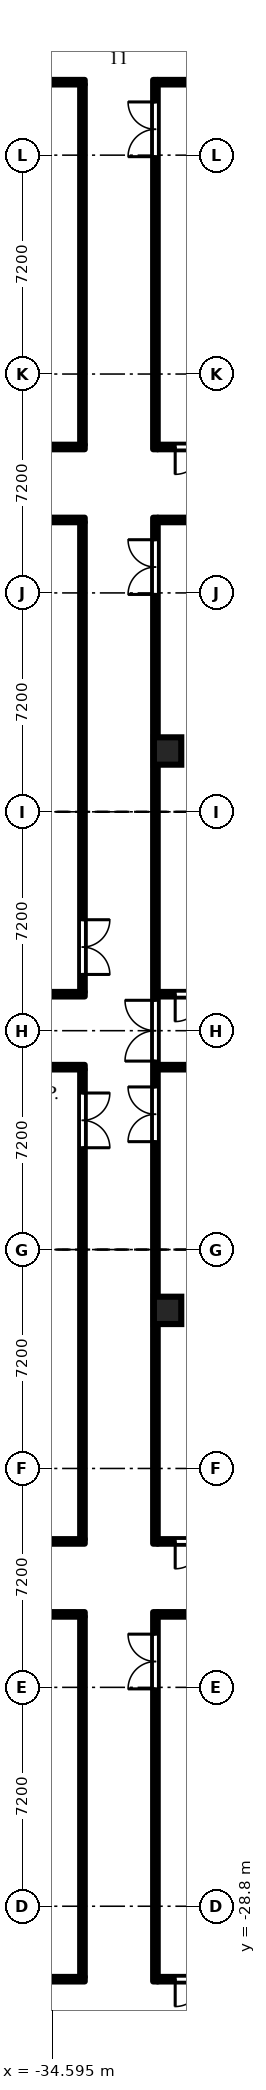
"""IFC4 building model, lengths in metres.
Left out: names, types, materials, properties, quantities, classifications, styles, units other than length and angle.
Written with IfcOpenShell. Run it as: python <this file> out.ifc"""

import sys

from ifc_helpers import new_model, si_unit, direction, frame, frame_2d, origin, origin_2d, place, context, subcontext, project, spatial, rectangle, extrude, element, fill, save


model = new_model("IFC4")
c1 = context("Model", 3, precision=1e-05, world=origin(), true_north=direction((0.0, 1.0)))
c2 = subcontext(c1, "Body", "Model", "MODEL_VIEW")
j1 = project(units=[si_unit("LENGTHUNIT", "METRE"), si_unit("PLANEANGLEUNIT", "RADIAN")], contexts=[c1])
p1 = place(None, origin())
s1 = spatial("IfcSite", under=j1, at=p1, CompositionType="ELEMENT")
p2 = place(p1, origin())
s2 = spatial("IfcBuilding", under=s1, at=p2, CompositionType="ELEMENT")
p3 = place(p2, frame((0.0, 0.0, -4.8)))
s3 = spatial("IfcBuildingStorey", under=s2, at=p3, CompositionType="ELEMENT", Elevation=-4.8)
for number, where, z_axis, x_axis in (
    (1, (-30.8, -9.2, -0.5), (0.0, 0.0, 1.0), (1.0, 0.0, 0.0)),
    (2, (-30.8, 9.2, -0.5), (0.0, 0.0, 1.0), (1.0, 0.0, 0.0)),
):
    element("IfcColumn", number, at=place(p3, frame(where, z_axis=z_axis, x_axis=x_axis)), inside=s3, PredefinedType="COLUMN", context=c2, shape_type="SweptSolid", body=[
        extrude(rectangle(XDim=0.9, YDim=0.9, at=origin_2d()), origin(), (0.0, 0.0, 1.0), 5.3),
    ])
p4 = place(p3, frame((-41.225, -31.2, 0.0), z_axis=(0.0, 0.0, 1.0), x_axis=(1.0, 0.0, 0.0)))
e3 = element("IfcWall", 3, at=p4, inside=s3, PredefinedType="PARTITIONING", context=c2, shape_type="SweptSolid", body=[
    extrude(rectangle(XDim=7.7, YDim=0.15, at=frame_2d((3.85, 0.0))), origin(), (0.0, 0.0, 1.0), 4.35),
])
p5 = place(p4, frame((2.375, 0.0, 0.0)))
e4 = element("IfcOpeningElement", 4, at=p5, cuts=e3, PredefinedType="OPENING", context=c2, shape_type="SweptSolid", body=[
    extrude(rectangle(XDim=1.8, YDim=2.1, at=frame_2d((0.9, 1.05))), frame((0.0, 0.085, 0.0), z_axis=(0.0, -1.0, 0.0), x_axis=(1.0, 0.0, 0.0)), (0.0, 0.0, 1.0), 0.17),
])
p6 = place(p3, frame((-41.225, -19.2, 0.0), z_axis=(0.0, 0.0, 1.0), x_axis=(1.0, 0.0, 0.0)))
e5 = element("IfcWall", 5, at=p6, inside=s3, PredefinedType="PARTITIONING", context=c2, shape_type="SweptSolid", body=[
    extrude(rectangle(XDim=7.7, YDim=0.15, at=frame_2d((3.85, 0.0))), origin(), (0.0, 0.0, 1.0), 4.35),
])
p7 = place(p6, frame((3.375, 0.0, 0.0)))
e6 = element("IfcOpeningElement", 6, at=p7, cuts=e5, PredefinedType="OPENING", context=c2, shape_type="SweptSolid", body=[
    extrude(rectangle(XDim=1.8, YDim=2.1, at=frame_2d((0.9, 1.05))), frame((0.0, 0.085, 0.0), z_axis=(0.0, -1.0, 0.0), x_axis=(1.0, 0.0, 0.0)), (0.0, 0.0, 1.0), 0.17),
])
p8 = place(p3, frame((-41.225, -16.8, 0.0), z_axis=(0.0, 0.0, 1.0), x_axis=(1.0, 0.0, 0.0)))
e7 = element("IfcWall", 7, at=p8, inside=s3, PredefinedType="PARTITIONING", context=c2, shape_type="SweptSolid", body=[
    extrude(rectangle(XDim=7.7, YDim=0.15, at=frame_2d((3.85, 0.0))), origin(), (0.0, 0.0, 1.0), 4.35),
])
p9 = place(p8, frame((2.375, 0.0, 0.0)))
e8 = element("IfcOpeningElement", 8, at=p9, cuts=e7, PredefinedType="OPENING", context=c2, shape_type="SweptSolid", body=[
    extrude(rectangle(XDim=1.8, YDim=2.1, at=frame_2d((0.9, 1.05))), frame((0.0, 0.085, 0.0), z_axis=(0.0, -1.0, 0.0), x_axis=(1.0, 0.0, 0.0)), (0.0, 0.0, 1.0), 0.17),
])
p10 = place(p3, frame((-41.225, 16.8, 0.0), z_axis=(0.0, 0.0, 1.0), x_axis=(1.0, 0.0, 0.0)))
e9 = element("IfcWall", 9, at=p10, inside=s3, PredefinedType="PARTITIONING", context=c2, shape_type="SweptSolid", body=[
    extrude(rectangle(XDim=7.7, YDim=0.15, at=frame_2d((3.85, 0.0))), origin(), (0.0, 0.0, 1.0), 4.35),
])
p11 = place(p10, frame((3.375, 0.0, 0.0)))
e10 = element("IfcOpeningElement", 10, at=p11, cuts=e9, PredefinedType="OPENING", context=c2, shape_type="SweptSolid", body=[
    extrude(rectangle(XDim=1.8, YDim=2.1, at=frame_2d((0.9, 1.05))), frame((0.0, 0.085, 0.0), z_axis=(0.0, -1.0, 0.0), x_axis=(1.0, 0.0, 0.0)), (0.0, 0.0, 1.0), 0.17),
])
p12 = place(p3, frame((-41.225, 19.2, 0.0), z_axis=(0.0, 0.0, 1.0), x_axis=(1.0, 0.0, 0.0)))
e11 = element("IfcWall", 11, at=p12, inside=s3, PredefinedType="PARTITIONING", context=c2, shape_type="SweptSolid", body=[
    extrude(rectangle(XDim=7.7, YDim=0.15, at=frame_2d((3.85, 0.0))), origin(), (0.0, 0.0, 1.0), 4.35),
])
p13 = place(p12, frame((2.375, 0.0, 0.0)))
e12 = element("IfcOpeningElement", 12, at=p13, cuts=e11, PredefinedType="OPENING", context=c2, shape_type="SweptSolid", body=[
    extrude(rectangle(XDim=1.8, YDim=2.1, at=frame_2d((0.9, 1.05))), frame((0.0, 0.085, 0.0), z_axis=(0.0, -1.0, 0.0), x_axis=(1.0, 0.0, 0.0)), (0.0, 0.0, 1.0), 0.17),
])
p14 = place(p3, frame((-41.225, 31.2, 0.0), z_axis=(0.0, 0.0, 1.0), x_axis=(1.0, 0.0, 0.0)))
e13 = element("IfcWall", 13, at=p14, inside=s3, PredefinedType="PARTITIONING", context=c2, shape_type="SweptSolid", body=[
    extrude(rectangle(XDim=7.7, YDim=0.15, at=frame_2d((3.85, 0.0))), origin(), (0.0, 0.0, 1.0), 4.35),
])
p15 = place(p14, frame((3.375, 0.0, 0.0)))
e14 = element("IfcOpeningElement", 14, at=p15, cuts=e13, PredefinedType="OPENING", context=c2, shape_type="SweptSolid", body=[
    extrude(rectangle(XDim=1.8, YDim=2.1, at=frame_2d((0.9, 1.05))), frame((0.0, 0.085, 0.0), z_axis=(0.0, -1.0, 0.0), x_axis=(1.0, 0.0, 0.0)), (0.0, 0.0, 1.0), 0.17),
])
for number, where, z_axis, x_axis in (
    (15, (-36.5, -1.2, 0.0), (0.0, 0.0, 1.0), (1.0, 0.0, 0.0)),
    (16, (-36.5, 1.2, 0.0), (0.0, 0.0, 1.0), (1.0, 0.0, 0.0)),
):
    element("IfcWall", number, at=place(p3, frame(where, z_axis=z_axis, x_axis=x_axis)), inside=s3, PredefinedType="PARTITIONING", context=c2, shape_type="SweptSolid", body=[
        extrude(rectangle(XDim=2.975, YDim=0.15, at=frame_2d((1.488, 0.0))), origin(), (0.0, 0.0, 1.0), 4.35),
    ])
p16 = place(p3, frame((-33.6, -31.125, 0.0), z_axis=(0.0, 0.0, 1.0), x_axis=(0.0, 1.0, 0.0)))
e17 = element("IfcWall", 17, at=p16, inside=s3, PredefinedType="PARTITIONING", context=c2, shape_type="SweptSolid", body=[
    extrude(rectangle(XDim=11.85, YDim=0.15, at=frame_2d((5.925, 0.0))), origin(), (0.0, 0.0, 1.0), 4.35),
])
p17 = place(p3, frame((-33.6, -16.725, 0.0), z_axis=(0.0, 0.0, 1.0), x_axis=(0.0, 1.0, 0.0)))
e18 = element("IfcWall", 18, at=p17, inside=s3, PredefinedType="PARTITIONING", context=c2, shape_type="SweptSolid", body=[
    extrude(rectangle(XDim=15.45, YDim=0.15, at=frame_2d((7.725, 0.0))), origin(), (0.0, 0.0, 1.0), 4.35),
])
p18 = place(p17, frame((12.875, 0.0, 0.0)))
e19 = element("IfcOpeningElement", 19, at=p18, cuts=e18, PredefinedType="OPENING", context=c2, shape_type="SweptSolid", body=[
    extrude(rectangle(XDim=1.8, YDim=2.1, at=frame_2d((0.9, 1.05))), frame((0.0, 0.085, 0.0), z_axis=(0.0, -1.0, 0.0), x_axis=(1.0, 0.0, 0.0)), (0.0, 0.0, 1.0), 0.17),
])
p19 = place(p3, frame((-33.6, 1.275, 0.0), z_axis=(0.0, 0.0, 1.0), x_axis=(0.0, 1.0, 0.0)))
e20 = element("IfcWall", 20, at=p19, inside=s3, PredefinedType="PARTITIONING", context=c2, shape_type="SweptSolid", body=[
    extrude(rectangle(XDim=15.45, YDim=0.15, at=frame_2d((7.725, 0.0))), origin(), (0.0, 0.0, 1.0), 4.35),
])
p20 = place(p19, frame((0.575, 0.0, 0.0)))
e21 = element("IfcOpeningElement", 21, at=p20, cuts=e20, PredefinedType="OPENING", context=c2, shape_type="SweptSolid", body=[
    extrude(rectangle(XDim=1.8, YDim=2.1, at=frame_2d((0.9, 1.05))), frame((0.0, 0.085, 0.0), z_axis=(0.0, -1.0, 0.0), x_axis=(1.0, 0.0, 0.0)), (0.0, 0.0, 1.0), 0.17),
])
p21 = place(p3, frame((-33.6, 19.275, 0.0), z_axis=(0.0, 0.0, 1.0), x_axis=(0.0, 1.0, 0.0)))
e22 = element("IfcWall", 22, at=p21, inside=s3, PredefinedType="PARTITIONING", context=c2, shape_type="SweptSolid", body=[
    extrude(rectangle(XDim=11.85, YDim=0.15, at=frame_2d((5.925, 0.0))), origin(), (0.0, 0.0, 1.0), 4.35),
])
p22 = place(p3, frame((-31.2, -31.275, 0.0), z_axis=(0.0, 0.0, 1.0), x_axis=(0.0, 1.0, 0.0)))
e23 = element("IfcWall", 23, at=p22, inside=s3, PredefinedType="PARTITIONING", context=c2, shape_type="SweptSolid", body=[
    extrude(rectangle(XDim=12.15, YDim=0.15, at=frame_2d((6.075, 0.0))), origin(), (0.0, 0.0, 1.0), 4.35),
])
p23 = place(p22, frame((9.625, 0.0, 0.0)))
e24 = element("IfcOpeningElement", 24, at=p23, cuts=e23, PredefinedType="OPENING", context=c2, shape_type="SweptSolid", body=[
    extrude(rectangle(XDim=1.8, YDim=2.1, at=frame_2d((0.9, 1.05))), frame((0.0, 0.085, 0.0), z_axis=(0.0, -1.0, 0.0), x_axis=(1.0, 0.0, 0.0)), (0.0, 0.0, 1.0), 0.17),
])
p24 = place(p3, frame((-31.125, -31.2, 0.0), z_axis=(0.0, 0.0, 1.0), x_axis=(1.0, 0.0, 0.0)))
e25 = element("IfcWall", 25, at=p24, inside=s3, PredefinedType="PARTITIONING", context=c2, shape_type="SweptSolid", body=[
    extrude(rectangle(XDim=12.6, YDim=0.15, at=frame_2d((6.3, 0.0))), origin(), (0.0, 0.0, 1.0), 4.35),
])
p25 = place(p24, frame((0.575, 0.0, 0.0)))
e26 = element("IfcOpeningElement", 26, at=p25, cuts=e25, PredefinedType="OPENING", context=c2, shape_type="SweptSolid", body=[
    extrude(rectangle(XDim=1.8, YDim=2.1, at=frame_2d((0.9, 1.05))), frame((0.0, 0.085, 0.0), z_axis=(0.0, -1.0, 0.0), x_axis=(1.0, 0.0, 0.0)), (0.0, 0.0, 1.0), 0.17),
])
p26 = place(p3, frame((-31.125, -19.2, 0.0), z_axis=(0.0, 0.0, 1.0), x_axis=(1.0, 0.0, 0.0)))
e27 = element("IfcWall", 27, at=p26, inside=s3, PredefinedType="PARTITIONING", context=c2, shape_type="SweptSolid", body=[
    extrude(rectangle(XDim=12.6, YDim=0.15, at=frame_2d((6.3, 0.0))), origin(), (0.0, 0.0, 1.0), 4.35),
])
p27 = place(p26, frame((10.075, 0.0, 0.0)))
e28 = element("IfcOpeningElement", 28, at=p27, cuts=e27, PredefinedType="OPENING", context=c2, shape_type="SweptSolid", body=[
    extrude(rectangle(XDim=1.8, YDim=2.1, at=frame_2d((0.9, 1.05))), frame((0.0, 0.085, 0.0), z_axis=(0.0, -1.0, 0.0), x_axis=(1.0, 0.0, 0.0)), (0.0, 0.0, 1.0), 0.17),
])
p28 = place(p3, frame((-31.2, -16.875, 0.0), z_axis=(0.0, 0.0, 1.0), x_axis=(0.0, 1.0, 0.0)))
e29 = element("IfcWall", 29, at=p28, inside=s3, PredefinedType="PARTITIONING", context=c2, shape_type="SweptSolid", body=[
    extrude(rectangle(XDim=33.75, YDim=0.15, at=frame_2d((16.875, 0.0))), origin(), (0.0, 0.0, 1.0), 4.35),
])
p29 = place(p28, frame((15.875, 0.0, 0.0)))
e30 = element("IfcOpeningElement", 30, at=p29, cuts=e29, PredefinedType="OPENING", context=c2, shape_type="SweptSolid", body=[
    extrude(rectangle(XDim=2.0, YDim=2.1, at=frame_2d((1.0, 1.05))), frame((0.0, 0.085, 0.0), z_axis=(0.0, -1.0, 0.0), x_axis=(1.0, 0.0, 0.0)), (0.0, 0.0, 1.0), 0.17),
])
p30 = place(p28, frame((31.225, 0.0, 0.0)))
e31 = element("IfcOpeningElement", 31, at=p30, cuts=e29, PredefinedType="OPENING", context=c2, shape_type="SweptSolid", body=[
    extrude(rectangle(XDim=1.8, YDim=2.1, at=frame_2d((0.9, 1.05))), frame((0.0, 0.085, 0.0), z_axis=(0.0, -1.0, 0.0), x_axis=(1.0, 0.0, 0.0)), (0.0, 0.0, 1.0), 0.17),
])
p31 = place(p28, frame((13.225, 0.0, 0.0)))
e32 = element("IfcOpeningElement", 32, at=p31, cuts=e29, PredefinedType="OPENING", context=c2, shape_type="SweptSolid", body=[
    extrude(rectangle(XDim=1.8, YDim=2.1, at=frame_2d((0.9, 1.05))), frame((0.0, 0.085, 0.0), z_axis=(0.0, -1.0, 0.0), x_axis=(1.0, 0.0, 0.0)), (0.0, 0.0, 1.0), 0.17),
])
p32 = place(p3, frame((-31.125, -16.8, 0.0), z_axis=(0.0, 0.0, 1.0), x_axis=(1.0, 0.0, 0.0)))
e33 = element("IfcWall", 33, at=p32, inside=s3, PredefinedType="PARTITIONING", context=c2, shape_type="SweptSolid", body=[
    extrude(rectangle(XDim=12.6, YDim=0.15, at=frame_2d((6.3, 0.0))), origin(), (0.0, 0.0, 1.0), 4.35),
])
p33 = place(p32, frame((0.575, 0.0, 0.0)))
e34 = element("IfcOpeningElement", 34, at=p33, cuts=e33, PredefinedType="OPENING", context=c2, shape_type="SweptSolid", body=[
    extrude(rectangle(XDim=1.8, YDim=2.1, at=frame_2d((0.9, 1.05))), frame((0.0, 0.085, 0.0), z_axis=(0.0, -1.0, 0.0), x_axis=(1.0, 0.0, 0.0)), (0.0, 0.0, 1.0), 0.17),
])
p34 = place(p3, frame((-31.125, -1.2, 0.0), z_axis=(0.0, 0.0, 1.0), x_axis=(1.0, 0.0, 0.0)))
e35 = element("IfcWall", 35, at=p34, inside=s3, PredefinedType="PARTITIONING", context=c2, shape_type="SweptSolid", body=[
    extrude(rectangle(XDim=9.525, YDim=0.15, at=frame_2d((4.762, 0.0))), origin(), (0.0, 0.0, 1.0), 4.35),
])
p35 = place(p34, frame((7.075, 0.0, 0.0)))
e36 = element("IfcOpeningElement", 36, at=p35, cuts=e35, PredefinedType="OPENING", context=c2, shape_type="SweptSolid", body=[
    extrude(rectangle(XDim=1.8, YDim=2.1, at=frame_2d((0.9, 1.05))), frame((0.0, 0.085, 0.0), z_axis=(0.0, -1.0, 0.0), x_axis=(1.0, 0.0, 0.0)), (0.0, 0.0, 1.0), 0.17),
])
p36 = place(p3, frame((-31.125, 1.2, 0.0), z_axis=(0.0, 0.0, 1.0), x_axis=(1.0, 0.0, 0.0)))
e37 = element("IfcWall", 37, at=p36, inside=s3, PredefinedType="PARTITIONING", context=c2, shape_type="SweptSolid", body=[
    extrude(rectangle(XDim=9.525, YDim=0.15, at=frame_2d((4.762, 0.0))), origin(), (0.0, 0.0, 1.0), 4.35),
])
p37 = place(p36, frame((0.575, 0.0, 0.0)))
e38 = element("IfcOpeningElement", 38, at=p37, cuts=e37, PredefinedType="OPENING", context=c2, shape_type="SweptSolid", body=[
    extrude(rectangle(XDim=1.8, YDim=2.1, at=frame_2d((0.9, 1.05))), frame((0.0, 0.085, 0.0), z_axis=(0.0, -1.0, 0.0), x_axis=(1.0, 0.0, 0.0)), (0.0, 0.0, 1.0), 0.17),
])
p38 = place(p36, frame((6.875, 0.0, 0.0)))
e39 = element("IfcOpeningElement", 39, at=p38, cuts=e37, PredefinedType="OPENING", context=c2, shape_type="SweptSolid", body=[
    extrude(rectangle(XDim=1.8, YDim=2.1, at=frame_2d((0.9, 1.05))), frame((0.0, 0.085, 0.0), z_axis=(0.0, -1.0, 0.0), x_axis=(1.0, 0.0, 0.0)), (0.0, 0.0, 1.0), 0.17),
])
p39 = place(p3, frame((-31.125, 16.8, 0.0), z_axis=(0.0, 0.0, 1.0), x_axis=(1.0, 0.0, 0.0)))
e40 = element("IfcWall", 40, at=p39, inside=s3, PredefinedType="PARTITIONING", context=c2, shape_type="SweptSolid", body=[
    extrude(rectangle(XDim=12.6, YDim=0.15, at=frame_2d((6.3, 0.0))), origin(), (0.0, 0.0, 1.0), 4.35),
])
p40 = place(p39, frame((10.075, 0.0, 0.0)))
e41 = element("IfcOpeningElement", 41, at=p40, cuts=e40, PredefinedType="OPENING", context=c2, shape_type="SweptSolid", body=[
    extrude(rectangle(XDim=1.8, YDim=2.1, at=frame_2d((0.9, 1.05))), frame((0.0, 0.085, 0.0), z_axis=(0.0, -1.0, 0.0), x_axis=(1.0, 0.0, 0.0)), (0.0, 0.0, 1.0), 0.17),
])
p41 = place(p3, frame((-31.2, 19.125, 0.0), z_axis=(0.0, 0.0, 1.0), x_axis=(0.0, 1.0, 0.0)))
e42 = element("IfcWall", 42, at=p41, inside=s3, PredefinedType="PARTITIONING", context=c2, shape_type="SweptSolid", body=[
    extrude(rectangle(XDim=12.15, YDim=0.15, at=frame_2d((6.075, 0.0))), origin(), (0.0, 0.0, 1.0), 4.35),
])
p42 = place(p41, frame((9.625, 0.0, 0.0)))
e43 = element("IfcOpeningElement", 43, at=p42, cuts=e42, PredefinedType="OPENING", context=c2, shape_type="SweptSolid", body=[
    extrude(rectangle(XDim=1.8, YDim=2.1, at=frame_2d((0.9, 1.05))), frame((0.0, 0.085, 0.0), z_axis=(0.0, -1.0, 0.0), x_axis=(1.0, 0.0, 0.0)), (0.0, 0.0, 1.0), 0.17),
])
p43 = place(p3, frame((-31.125, 19.2, 0.0), z_axis=(0.0, 0.0, 1.0), x_axis=(1.0, 0.0, 0.0)))
e44 = element("IfcWall", 44, at=p43, inside=s3, PredefinedType="PARTITIONING", context=c2, shape_type="SweptSolid", body=[
    extrude(rectangle(XDim=12.6, YDim=0.15, at=frame_2d((6.3, 0.0))), origin(), (0.0, 0.0, 1.0), 4.35),
])
p44 = place(p43, frame((0.575, 0.0, 0.0)))
e45 = element("IfcOpeningElement", 45, at=p44, cuts=e44, PredefinedType="OPENING", context=c2, shape_type="SweptSolid", body=[
    extrude(rectangle(XDim=1.8, YDim=2.1, at=frame_2d((0.9, 1.05))), frame((0.0, 0.085, 0.0), z_axis=(0.0, -1.0, 0.0), x_axis=(1.0, 0.0, 0.0)), (0.0, 0.0, 1.0), 0.17),
])
p45 = place(p3, frame((-31.125, 31.2, 0.0), z_axis=(0.0, 0.0, 1.0), x_axis=(1.0, 0.0, 0.0)))
e46 = element("IfcWall", 46, at=p45, inside=s3, PredefinedType="PARTITIONING", context=c2, shape_type="SweptSolid", body=[
    extrude(rectangle(XDim=12.6, YDim=0.15, at=frame_2d((6.3, 0.0))), origin(), (0.0, 0.0, 1.0), 4.35),
])
p46 = place(p45, frame((10.075, 0.0, 0.0)))
e47 = element("IfcOpeningElement", 47, at=p46, cuts=e46, PredefinedType="OPENING", context=c2, shape_type="SweptSolid", body=[
    extrude(rectangle(XDim=1.8, YDim=2.1, at=frame_2d((0.9, 1.05))), frame((0.0, 0.085, 0.0), z_axis=(0.0, -1.0, 0.0), x_axis=(1.0, 0.0, 0.0)), (0.0, 0.0, 1.0), 0.17),
])
p47 = place(p29, origin())
e48 = element("IfcDoor", 48, at=p47, inside=s3, OperationType="DOUBLE_DOOR_DOUBLE_SWING", PredefinedType="DOOR", context=c2, shape_type="SweptSolid", body=[
    extrude(rectangle(XDim=2.0, YDim=2.1, at=frame_2d((1.0, 1.05))), frame((0.0, 0.025, 0.0), z_axis=(0.0, -1.0, 0.0), x_axis=(1.0, 0.0, 0.0)), (0.0, 0.0, 1.0), 0.05),
])
fill(e30, e48)
p48 = place(p30, origin())
e49 = element("IfcDoor", 49, at=p48, inside=s3, OperationType="DOUBLE_DOOR_DOUBLE_SWING", PredefinedType="DOOR", context=c2, shape_type="SweptSolid", body=[
    extrude(rectangle(XDim=1.8, YDim=2.1, at=frame_2d((0.9, 1.05))), frame((0.0, 0.025, 0.0), z_axis=(0.0, -1.0, 0.0), x_axis=(1.0, 0.0, 0.0)), (0.0, 0.0, 1.0), 0.05),
])
fill(e31, e49)
p49 = place(p37, frame((1.8, 0.0, 0.0), z_axis=(0.0, 0.0, 1.0), x_axis=(-1.0, 0.0, 0.0)))
e50 = element("IfcDoor", 50, at=p49, inside=s3, OperationType="DOUBLE_DOOR_DOUBLE_SWING", PredefinedType="DOOR", context=c2, shape_type="SweptSolid", body=[
    extrude(rectangle(XDim=1.8, YDim=2.1, at=frame_2d((0.9, 1.05))), frame((0.0, 0.025, 0.0), z_axis=(0.0, -1.0, 0.0), x_axis=(1.0, 0.0, 0.0)), (0.0, 0.0, 1.0), 0.05),
])
fill(e38, e50)
p50 = place(p42, origin())
e51 = element("IfcDoor", 51, at=p50, inside=s3, OperationType="DOUBLE_DOOR_DOUBLE_SWING", PredefinedType="DOOR", context=c2, shape_type="SweptSolid", body=[
    extrude(rectangle(XDim=1.8, YDim=2.1, at=frame_2d((0.9, 1.05))), frame((0.0, 0.025, 0.0), z_axis=(0.0, -1.0, 0.0), x_axis=(1.0, 0.0, 0.0)), (0.0, 0.0, 1.0), 0.05),
])
fill(e43, e51)
p51 = place(p44, frame((1.8, 0.0, 0.0), z_axis=(0.0, 0.0, 1.0), x_axis=(-1.0, 0.0, 0.0)))
e52 = element("IfcDoor", 52, at=p51, inside=s3, OperationType="DOUBLE_DOOR_DOUBLE_SWING", PredefinedType="DOOR", context=c2, shape_type="SweptSolid", body=[
    extrude(rectangle(XDim=1.8, YDim=2.1, at=frame_2d((0.9, 1.05))), frame((0.0, 0.025, 0.0), z_axis=(0.0, -1.0, 0.0), x_axis=(1.0, 0.0, 0.0)), (0.0, 0.0, 1.0), 0.05),
])
fill(e45, e52)
p52 = place(p31, origin())
e53 = element("IfcDoor", 53, at=p52, inside=s3, OperationType="DOUBLE_DOOR_DOUBLE_SWING", PredefinedType="DOOR", context=c2, shape_type="SweptSolid", body=[
    extrude(rectangle(XDim=1.8, YDim=2.1, at=frame_2d((0.9, 1.05))), frame((0.0, 0.025, 0.0), z_axis=(0.0, -1.0, 0.0), x_axis=(1.0, 0.0, 0.0)), (0.0, 0.0, 1.0), 0.05),
])
fill(e32, e53)
p53 = place(p33, frame((1.8, 0.0, 0.0), z_axis=(0.0, 0.0, 1.0), x_axis=(-1.0, 0.0, 0.0)))
e54 = element("IfcDoor", 54, at=p53, inside=s3, OperationType="DOUBLE_DOOR_DOUBLE_SWING", PredefinedType="DOOR", context=c2, shape_type="SweptSolid", body=[
    extrude(rectangle(XDim=1.8, YDim=2.1, at=frame_2d((0.9, 1.05))), frame((0.0, 0.025, 0.0), z_axis=(0.0, -1.0, 0.0), x_axis=(1.0, 0.0, 0.0)), (0.0, 0.0, 1.0), 0.05),
])
fill(e34, e54)
p54 = place(p23, origin())
e55 = element("IfcDoor", 55, at=p54, inside=s3, OperationType="DOUBLE_DOOR_DOUBLE_SWING", PredefinedType="DOOR", context=c2, shape_type="SweptSolid", body=[
    extrude(rectangle(XDim=1.8, YDim=2.1, at=frame_2d((0.9, 1.05))), frame((0.0, 0.025, 0.0), z_axis=(0.0, -1.0, 0.0), x_axis=(1.0, 0.0, 0.0)), (0.0, 0.0, 1.0), 0.05),
])
fill(e24, e55)
p55 = place(p25, frame((1.8, 0.0, 0.0), z_axis=(0.0, 0.0, 1.0), x_axis=(-1.0, 0.0, 0.0)))
e56 = element("IfcDoor", 56, at=p55, inside=s3, OperationType="DOUBLE_DOOR_DOUBLE_SWING", PredefinedType="DOOR", context=c2, shape_type="SweptSolid", body=[
    extrude(rectangle(XDim=1.8, YDim=2.1, at=frame_2d((0.9, 1.05))), frame((0.0, 0.025, 0.0), z_axis=(0.0, -1.0, 0.0), x_axis=(1.0, 0.0, 0.0)), (0.0, 0.0, 1.0), 0.05),
])
fill(e26, e56)
p56 = place(p20, frame((1.8, 0.0, 0.0), z_axis=(0.0, 0.0, 1.0), x_axis=(-1.0, 0.0, 0.0)))
e57 = element("IfcDoor", 57, at=p56, inside=s3, OperationType="DOUBLE_DOOR_DOUBLE_SWING", PredefinedType="DOOR", context=c2, shape_type="SweptSolid", body=[
    extrude(rectangle(XDim=1.8, YDim=2.1, at=frame_2d((0.9, 1.05))), frame((0.0, 0.025, 0.0), z_axis=(0.0, -1.0, 0.0), x_axis=(1.0, 0.0, 0.0)), (0.0, 0.0, 1.0), 0.05),
])
fill(e21, e57)
p57 = place(p18, frame((1.8, 0.0, 0.0), z_axis=(0.0, 0.0, 1.0), x_axis=(-1.0, 0.0, 0.0)))
e58 = element("IfcDoor", 58, at=p57, inside=s3, OperationType="DOUBLE_DOOR_DOUBLE_SWING", PredefinedType="DOOR", context=c2, shape_type="SweptSolid", body=[
    extrude(rectangle(XDim=1.8, YDim=2.1, at=frame_2d((0.9, 1.05))), frame((0.0, 0.025, 0.0), z_axis=(0.0, -1.0, 0.0), x_axis=(1.0, 0.0, 0.0)), (0.0, 0.0, 1.0), 0.05),
])
fill(e19, e58)
save(model, sys.argv[1])
